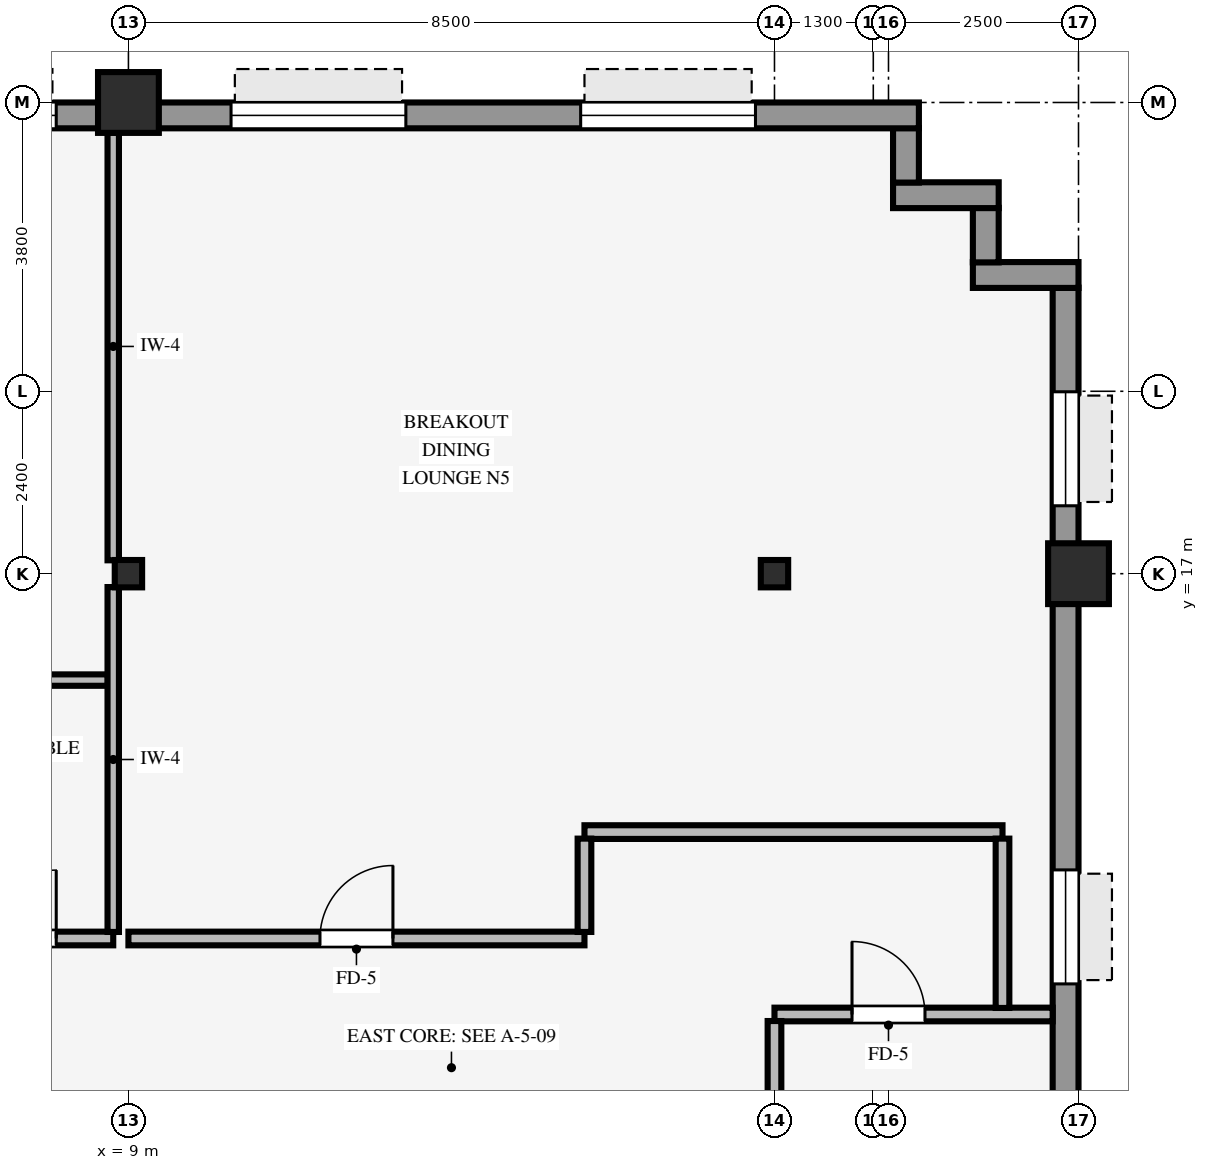
"""IFC4 building model, lengths in metres.
Left out: names, types, materials, properties, quantities, classifications, styles, units other than length and angle.
Written with IfcOpenShell. Run it as: python <this file> out.ifc"""

import sys

from ifc_helpers import new_model, si_unit, direction, frame, frame_2d, origin, origin_2d, place, context, subcontext, project, spatial, rectangle, hollow_rectangle, i_section, extrude, source, transform, mapped, element, fill, save


model = new_model("IFC4")
c1 = context("Model", 3, precision=1e-05, world=origin(), true_north=direction((0.0, 1.0)))
c2 = subcontext(c1, "Body", "Model", "MODEL_VIEW")
j1 = project(units=[si_unit("LENGTHUNIT", "METRE"), si_unit("PLANEANGLEUNIT", "RADIAN")], contexts=[c1])
p1 = place(None, origin())
s1 = spatial("IfcSite", under=j1, at=p1, CompositionType="ELEMENT")
p2 = place(p1, origin())
s2 = spatial("IfcBuilding", under=s1, at=p2, CompositionType="ELEMENT")
p3 = place(p2, frame((0.0, 0.0, 56.8)))
s3 = spatial("IfcBuildingStorey", under=s2, at=p3, CompositionType="ELEMENT", Elevation=56.8)
p4 = place(p3, frame((21.5, 17.0, -0.4), z_axis=(0.0, 0.0, 1.0), x_axis=(1.0, 0.0, 0.0)))
e1 = element("IfcColumn", 1, at=p4, inside=s3, PredefinedType="COLUMN", context=c2, shape_type="SweptSolid", body=[
    extrude(hollow_rectangle(XDim=0.8, YDim=0.8, WallThickness=0.055, InnerFilletRadius=0.055, OuterFilletRadius=0.11, at=origin_2d()), origin(), (0.0, 0.0, 1.0), 3.77),
])
p5 = place(p3, frame((9.0, 23.2, 0.0), z_axis=(0.0, 0.0, 1.0), x_axis=(1.0, 0.0, 0.0)))
e2 = element("IfcColumn", 2, at=p5, inside=s3, PredefinedType="COLUMN", context=c2, shape_type="SweptSolid", body=[
    extrude(hollow_rectangle(XDim=0.8, YDim=0.8, WallThickness=0.055, InnerFilletRadius=0.055, OuterFilletRadius=0.11, at=origin_2d()), origin(), (0.0, 0.0, 1.0), 3.37),
])
for number, where, z_axis, x_axis in (
    (3, (9.0, 17.0, 0.0), (0.0, 0.0, 1.0), (1.0, 0.0, 0.0)),
    (4, (17.5, 17.0, 0.0), (0.0, 0.0, 1.0), (1.0, 0.0, 0.0)),
):
    element("IfcColumn", number, at=place(p3, frame(where, z_axis=z_axis, x_axis=x_axis)), inside=s3, PredefinedType="COLUMN", context=c2, shape_type="SweptSolid", body=[
        extrude(i_section(OverallWidth=0.36, OverallDepth=0.36, WebThickness=0.021, FlangeThickness=0.021, FilletRadius=0.018, at=origin_2d()), origin(), (0.0, 0.0, 1.0), 3.37),
    ])
p6 = place(p3, frame((21.33, -20.764, 0.0), z_axis=(0.0, 0.0, 1.0), x_axis=(0.0, 1.0, 0.0)))
e5 = element("IfcWall", 5, at=p6, inside=s3, PredefinedType="STANDARD", context=c2, shape_type="SweptSolid", body=[
    extrude(rectangle(XDim=41.528, YDim=0.34, at=frame_2d((20.764, 0.0))), origin(), (0.0, 0.0, 1.0), 2.705),
])
p7 = place(p6, frame((26.014, 0.0, 0.0), z_axis=(0.0, 0.0, 1.0), x_axis=(-1.0, 0.0, 0.0)))
e6 = element("IfcOpeningElement", 6, at=p7, cuts=e5, PredefinedType="OPENING", context=c2, shape_type="SweptSolid", body=[
    extrude(rectangle(XDim=1.05, YDim=2.1, at=frame_2d((0.525, 1.05))), frame((0.0, 0.18, 0.0), z_axis=(0.0, -1.0, 0.0), x_axis=(1.0, 0.0, 0.0)), (0.0, 0.0, 1.0), 0.36),
])
p8 = place(p6, frame((1.371, 0.0, 0.8)))
e7 = element("IfcOpeningElement", 7, at=p8, cuts=e5, PredefinedType="OPENING", context=c2, shape_type="SweptSolid", body=[
    extrude(rectangle(XDim=1.5, YDim=1.6, at=frame_2d((0.75, 0.8))), frame((0.0, 0.18, 0.0), z_axis=(0.0, -1.0, 0.0), x_axis=(1.0, 0.0, 0.0)), (0.0, 0.0, 1.0), 0.36),
])
p9 = place(p6, frame((7.662, 0.0, 0.8)))
e8 = element("IfcOpeningElement", 8, at=p9, cuts=e5, PredefinedType="OPENING", context=c2, shape_type="SweptSolid", body=[
    extrude(rectangle(XDim=1.5, YDim=1.6, at=frame_2d((0.75, 0.8))), frame((0.0, 0.18, 0.0), z_axis=(0.0, -1.0, 0.0), x_axis=(1.0, 0.0, 0.0)), (0.0, 0.0, 1.0), 0.36),
])
p10 = place(p6, frame((12.603, 0.0, 0.8)))
e9 = element("IfcOpeningElement", 9, at=p10, cuts=e5, PredefinedType="OPENING", context=c2, shape_type="SweptSolid", body=[
    extrude(rectangle(XDim=1.5, YDim=1.6, at=frame_2d((0.75, 0.8))), frame((0.0, 0.18, 0.0), z_axis=(0.0, -1.0, 0.0), x_axis=(1.0, 0.0, 0.0)), (0.0, 0.0, 1.0), 0.36),
])
p11 = place(p6, frame((16.644, 0.0, 0.8)))
e10 = element("IfcOpeningElement", 10, at=p11, cuts=e5, PredefinedType="OPENING", context=c2, shape_type="SweptSolid", body=[
    extrude(rectangle(XDim=1.5, YDim=1.6, at=frame_2d((0.75, 0.8))), frame((0.0, 0.18, 0.0), z_axis=(0.0, -1.0, 0.0), x_axis=(1.0, 0.0, 0.0)), (0.0, 0.0, 1.0), 0.36),
])
p12 = place(p6, frame((22.485, 0.0, 0.8)))
e11 = element("IfcOpeningElement", 11, at=p12, cuts=e5, PredefinedType="OPENING", context=c2, shape_type="SweptSolid", body=[
    extrude(rectangle(XDim=1.5, YDim=1.6, at=frame_2d((0.75, 0.8))), frame((0.0, 0.18, 0.0), z_axis=(0.0, -1.0, 0.0), x_axis=(1.0, 0.0, 0.0)), (0.0, 0.0, 1.0), 0.36),
])
p13 = place(p6, frame((27.426, 0.0, 0.8)))
e12 = element("IfcOpeningElement", 12, at=p13, cuts=e5, PredefinedType="OPENING", context=c2, shape_type="SweptSolid", body=[
    extrude(rectangle(XDim=1.5, YDim=1.6, at=frame_2d((0.75, 0.8))), frame((0.0, 0.18, 0.0), z_axis=(0.0, -1.0, 0.0), x_axis=(1.0, 0.0, 0.0)), (0.0, 0.0, 1.0), 0.36),
])
p14 = place(p6, frame((32.366, 0.0, 0.8)))
e13 = element("IfcOpeningElement", 13, at=p14, cuts=e5, PredefinedType="OPENING", context=c2, shape_type="SweptSolid", body=[
    extrude(rectangle(XDim=1.5, YDim=1.6, at=frame_2d((0.75, 0.8))), frame((0.0, 0.18, 0.0), z_axis=(0.0, -1.0, 0.0), x_axis=(1.0, 0.0, 0.0)), (0.0, 0.0, 1.0), 0.36),
])
p15 = place(p6, frame((38.657, 0.0, 0.8)))
e14 = element("IfcOpeningElement", 14, at=p15, cuts=e5, PredefinedType="OPENING", context=c2, shape_type="SweptSolid", body=[
    extrude(rectangle(XDim=1.5, YDim=1.6, at=frame_2d((0.75, 0.8))), frame((0.0, 0.18, 0.0), z_axis=(0.0, -1.0, 0.0), x_axis=(1.0, 0.0, 0.0)), (0.0, 0.0, 1.0), 0.36),
])
p16 = place(p3, frame((20.11, 20.93, 0.0), z_axis=(0.0, 0.0, 1.0), x_axis=(1.0, 0.0, 0.0)))
e15 = element("IfcWall", 15, at=p16, inside=s3, PredefinedType="STANDARD", context=c2, shape_type="SweptSolid", body=[
    extrude(rectangle(XDim=1.39, YDim=0.34, at=frame_2d((0.695, 0.0))), origin(), (0.0, 0.0, 1.0), 3.36),
])
p17 = place(p3, frame((20.28, 21.096, 0.0), z_axis=(0.0, 0.0, 1.0), x_axis=(0.0, 1.0, 0.0)))
e16 = element("IfcWall", 16, at=p17, inside=s3, PredefinedType="STANDARD", context=c2, shape_type="SweptSolid", body=[
    extrude(rectangle(XDim=0.718, YDim=0.34, at=frame_2d((0.359, 0.0))), origin(), (0.0, 0.0, 1.0), 3.36),
])
p18 = place(p3, frame((19.06, 21.98, 0.0), z_axis=(0.0, 0.0, 1.0), x_axis=(1.0, 0.0, 0.0)))
e17 = element("IfcWall", 17, at=p18, inside=s3, PredefinedType="STANDARD", context=c2, shape_type="SweptSolid", body=[
    extrude(rectangle(XDim=1.39, YDim=0.34, at=frame_2d((0.695, 0.0))), origin(), (0.0, 0.0, 1.0), 3.36),
])
p19 = place(p3, frame((19.23, 22.146, 0.0), z_axis=(0.0, 0.0, 1.0), x_axis=(0.0, 1.0, 0.0)))
e18 = element("IfcWall", 18, at=p19, inside=s3, PredefinedType="STANDARD", context=c2, shape_type="SweptSolid", body=[
    extrude(rectangle(XDim=0.718, YDim=0.34, at=frame_2d((0.359, 0.0))), origin(), (0.0, 0.0, 1.0), 3.36),
])
p20 = place(p3, frame((-19.4, 23.03, 0.0), z_axis=(0.0, 0.0, 1.0), x_axis=(1.0, 0.0, 0.0)))
e19 = element("IfcWall", 19, at=p20, inside=s3, PredefinedType="STANDARD", context=c2, shape_type="SweptSolid", body=[
    extrude(rectangle(XDim=38.8, YDim=0.34, at=frame_2d((19.4, 0.0))), origin(), (0.0, 0.0, 1.0), 2.705),
])
p21 = place(p20, frame((3.05, 0.0, 0.8)))
e20 = element("IfcOpeningElement", 20, at=p21, cuts=e19, PredefinedType="OPENING", context=c2, shape_type="SweptSolid", body=[
    extrude(rectangle(XDim=2.3, YDim=1.62, at=frame_2d((1.15, 0.81))), frame((0.0, 0.18, 0.0), z_axis=(0.0, -1.0, 0.0), x_axis=(1.0, 0.0, 0.0)), (0.0, 0.0, 1.0), 0.36),
])
p22 = place(p20, frame((5.85, 0.0, 0.8)))
e21 = element("IfcOpeningElement", 21, at=p22, cuts=e19, PredefinedType="OPENING", context=c2, shape_type="SweptSolid", body=[
    extrude(rectangle(XDim=2.3, YDim=1.62, at=frame_2d((1.15, 0.81))), frame((0.0, 0.18, 0.0), z_axis=(0.0, -1.0, 0.0), x_axis=(1.0, 0.0, 0.0)), (0.0, 0.0, 1.0), 0.36),
])
p23 = place(p20, frame((11.35, 0.0, 0.8)))
e22 = element("IfcOpeningElement", 22, at=p23, cuts=e19, PredefinedType="OPENING", context=c2, shape_type="SweptSolid", body=[
    extrude(rectangle(XDim=2.3, YDim=1.62, at=frame_2d((1.15, 0.81))), frame((0.0, 0.18, 0.0), z_axis=(0.0, -1.0, 0.0), x_axis=(1.0, 0.0, 0.0)), (0.0, 0.0, 1.0), 0.36),
])
p24 = place(p20, frame((15.95, 0.0, 0.8)))
e23 = element("IfcOpeningElement", 23, at=p24, cuts=e19, PredefinedType="OPENING", context=c2, shape_type="SweptSolid", body=[
    extrude(rectangle(XDim=2.3, YDim=1.62, at=frame_2d((1.15, 0.81))), frame((0.0, 0.18, 0.0), z_axis=(0.0, -1.0, 0.0), x_axis=(1.0, 0.0, 0.0)), (0.0, 0.0, 1.0), 0.36),
])
p25 = place(p20, frame((20.55, 0.0, 0.8)))
e24 = element("IfcOpeningElement", 24, at=p25, cuts=e19, PredefinedType="OPENING", context=c2, shape_type="SweptSolid", body=[
    extrude(rectangle(XDim=2.3, YDim=1.62, at=frame_2d((1.15, 0.81))), frame((0.0, 0.18, 0.0), z_axis=(0.0, -1.0, 0.0), x_axis=(1.0, 0.0, 0.0)), (0.0, 0.0, 1.0), 0.36),
])
p26 = place(p20, frame((25.15, 0.0, 0.8)))
e25 = element("IfcOpeningElement", 25, at=p26, cuts=e19, PredefinedType="OPENING", context=c2, shape_type="SweptSolid", body=[
    extrude(rectangle(XDim=2.3, YDim=1.62, at=frame_2d((1.15, 0.81))), frame((0.0, 0.18, 0.0), z_axis=(0.0, -1.0, 0.0), x_axis=(1.0, 0.0, 0.0)), (0.0, 0.0, 1.0), 0.36),
])
p27 = place(p20, frame((29.75, 0.0, 0.8)))
e26 = element("IfcOpeningElement", 26, at=p27, cuts=e19, PredefinedType="OPENING", context=c2, shape_type="SweptSolid", body=[
    extrude(rectangle(XDim=2.3, YDim=1.62, at=frame_2d((1.15, 0.81))), frame((0.0, 0.18, 0.0), z_axis=(0.0, -1.0, 0.0), x_axis=(1.0, 0.0, 0.0)), (0.0, 0.0, 1.0), 0.36),
])
p28 = place(p20, frame((34.35, 0.0, 0.8)))
e27 = element("IfcOpeningElement", 27, at=p28, cuts=e19, PredefinedType="OPENING", context=c2, shape_type="SweptSolid", body=[
    extrude(rectangle(XDim=2.3, YDim=1.62, at=frame_2d((1.15, 0.81))), frame((0.0, 0.18, 0.0), z_axis=(0.0, -1.0, 0.0), x_axis=(1.0, 0.0, 0.0)), (0.0, 0.0, 1.0), 0.36),
])
p29 = place(p3, frame((17.5, 11.2, 0.0), z_axis=(0.0, 0.0, 1.0), x_axis=(1.0, 0.0, 0.0)))
e28 = element("IfcWall", 28, at=p29, inside=s3, PredefinedType="PARTITIONING", context=c2, shape_type="SweptSolid", body=[
    extrude(rectangle(XDim=3.66, YDim=0.18, at=frame_2d((1.83, 0.0))), origin(), (0.0, 0.0, 1.0), 3.36),
])
p30 = place(p29, frame((1.02, 0.0, 0.0)))
e29 = element("IfcOpeningElement", 29, at=p30, cuts=e28, PredefinedType="OPENING", context=c2, shape_type="SweptSolid", body=[
    extrude(rectangle(XDim=0.96, YDim=2.1, at=frame_2d((0.48, 1.05))), frame((0.0, 0.1, 0.0), z_axis=(0.0, -1.0, 0.0), x_axis=(1.0, 0.0, 0.0)), (0.0, 0.0, 1.0), 0.2),
])
p31 = place(p3, frame((-15.0, 12.2, 0.0), z_axis=(0.0, 0.0, 1.0), x_axis=(1.0, 0.0, 0.0)))
e30 = element("IfcWall", 30, at=p31, inside=s3, PredefinedType="PARTITIONING", context=c2, shape_type="SweptSolid", body=[
    extrude(rectangle(XDim=23.8, YDim=0.18, at=frame_2d((11.9, 0.0))), origin(), (0.0, 0.0, 1.0), 3.36),
])
p32 = place(p31, frame((7.655, 0.0, 0.0)))
e31 = element("IfcOpeningElement", 31, at=p32, cuts=e30, PredefinedType="OPENING", context=c2, shape_type="SweptSolid", body=[
    extrude(rectangle(XDim=0.96, YDim=2.1, at=frame_2d((0.48, 1.05))), frame((0.0, 0.1, 0.0), z_axis=(0.0, -1.0, 0.0), x_axis=(1.0, 0.0, 0.0)), (0.0, 0.0, 1.0), 0.2),
])
p33 = place(p31, frame((1.755, 0.0, 0.0)))
e32 = element("IfcOpeningElement", 32, at=p33, cuts=e30, PredefinedType="OPENING", context=c2, shape_type="SweptSolid", body=[
    extrude(rectangle(XDim=0.96, YDim=2.1, at=frame_2d((0.48, 1.05))), frame((0.0, 0.1, 0.0), z_axis=(0.0, -1.0, 0.0), x_axis=(1.0, 0.0, 0.0)), (0.0, 0.0, 1.0), 0.2),
])
p34 = place(p31, frame((19.65, 0.0, 0.0)))
e33 = element("IfcOpeningElement", 33, at=p34, cuts=e30, PredefinedType="OPENING", context=c2, shape_type="SweptSolid", body=[
    extrude(rectangle(XDim=0.9, YDim=2.1, at=frame_2d((0.45, 1.05))), frame((0.0, 0.1, 0.0), z_axis=(0.0, -1.0, 0.0), x_axis=(1.0, 0.0, 0.0)), (0.0, 0.0, 1.0), 0.2),
])
p35 = place(p31, frame((17.05, 0.0, 0.0)))
e34 = element("IfcOpeningElement", 34, at=p35, cuts=e30, PredefinedType="OPENING", context=c2, shape_type="SweptSolid", body=[
    extrude(rectangle(XDim=0.9, YDim=2.1, at=frame_2d((0.45, 1.05))), frame((0.0, 0.1, 0.0), z_axis=(0.0, -1.0, 0.0), x_axis=(1.0, 0.0, 0.0)), (0.0, 0.0, 1.0), 0.2),
])
p36 = place(p31, frame((22.15, 0.0, 0.0)))
e35 = element("IfcOpeningElement", 35, at=p36, cuts=e30, PredefinedType="OPENING", context=c2, shape_type="SweptSolid", body=[
    extrude(rectangle(XDim=0.9, YDim=2.1, at=frame_2d((0.45, 1.05))), frame((0.0, 0.1, 0.0), z_axis=(0.0, -1.0, 0.0), x_axis=(1.0, 0.0, 0.0)), (0.0, 0.0, 1.0), 0.2),
])
p37 = place(p31, frame((14.72, 0.0, 0.0)))
e36 = element("IfcOpeningElement", 36, at=p37, cuts=e30, PredefinedType="OPENING", context=c2, shape_type="SweptSolid", body=[
    extrude(rectangle(XDim=0.96, YDim=2.1, at=frame_2d((0.48, 1.05))), frame((0.0, 0.1, 0.0), z_axis=(0.0, -1.0, 0.0), x_axis=(1.0, 0.0, 0.0)), (0.0, 0.0, 1.0), 0.2),
])
p38 = place(p3, frame((9.0, 12.2, 0.0), z_axis=(0.0, 0.0, 1.0), x_axis=(1.0, 0.0, 0.0)))
e37 = element("IfcWall", 37, at=p38, inside=s3, PredefinedType="PARTITIONING", context=c2, shape_type="SweptSolid", body=[
    extrude(rectangle(XDim=6.0, YDim=0.18, at=frame_2d((3.0, 0.0))), origin(), (0.0, 0.0, 1.0), 3.36),
])
p39 = place(p38, frame((2.52, 0.0, 0.0)))
e38 = element("IfcOpeningElement", 38, at=p39, cuts=e37, PredefinedType="OPENING", context=c2, shape_type="SweptSolid", body=[
    extrude(rectangle(XDim=0.96, YDim=2.1, at=frame_2d((0.48, 1.05))), frame((0.0, 0.1, 0.0), z_axis=(0.0, -1.0, 0.0), x_axis=(1.0, 0.0, 0.0)), (0.0, 0.0, 1.0), 0.2),
])
p40 = place(p3, frame((15.0, 13.6, 0.0), z_axis=(0.0, 0.0, 1.0), x_axis=(1.0, 0.0, 0.0)))
e39 = element("IfcWall", 39, at=p40, inside=s3, PredefinedType="PARTITIONING", context=c2, shape_type="SweptSolid", body=[
    extrude(rectangle(XDim=5.5, YDim=0.18, at=frame_2d((2.75, 0.0))), origin(), (0.0, 0.0, 1.0), 2.942),
])
p41 = place(p3, frame((1.2, 15.6, 0.0), z_axis=(0.0, 0.0, 1.0), x_axis=(1.0, 0.0, 0.0)))
e40 = element("IfcWall", 40, at=p41, inside=s3, PredefinedType="PARTITIONING", context=c2, shape_type="SweptSolid", body=[
    extrude(rectangle(XDim=7.529, YDim=0.15, at=frame_2d((3.765, 0.0))), origin(), (0.0, 0.0, 1.0), 3.36),
])
p42 = place(p3, frame((8.8, 12.286, 0.0), z_axis=(0.0, 0.0, 1.0), x_axis=(0.0, 1.0, 0.0)))
e41 = element("IfcWall", 41, at=p42, inside=s3, PredefinedType="PARTITIONING", context=c2, shape_type="SweptSolid", body=[
    extrude(rectangle(XDim=4.538, YDim=0.15, at=frame_2d((2.269, 0.0))), origin(), (0.0, 0.0, 1.0), 2.738),
])
p43 = place(p3, frame((8.8, 17.176, 0.0), z_axis=(0.0, 0.0, 1.0), x_axis=(0.0, 1.0, 0.0)))
e42 = element("IfcWall", 42, at=p43, inside=s3, PredefinedType="PARTITIONING", context=c2, shape_type="SweptSolid", body=[
    extrude(rectangle(XDim=5.628, YDim=0.15, at=frame_2d((2.814, 0.0))), origin(), (0.0, 0.0, 1.0), 2.738),
])
p44 = place(p3, frame((15.0, 12.286, 0.0), z_axis=(0.0, 0.0, 1.0), x_axis=(0.0, 1.0, 0.0)))
e43 = element("IfcWall", 43, at=p44, inside=s3, PredefinedType="PARTITIONING", context=c2, shape_type="SweptSolid", body=[
    extrude(rectangle(XDim=1.228, YDim=0.18, at=frame_2d((0.614, 0.0))), origin(), (0.0, 0.0, 1.0), 3.36),
])
p45 = place(p3, frame((17.5, 10.146, 0.0), z_axis=(0.0, 0.0, 1.0), x_axis=(0.0, 1.0, 0.0)))
e44 = element("IfcWall", 44, at=p45, inside=s3, PredefinedType="PARTITIONING", context=c2, shape_type="SweptSolid", body=[
    extrude(rectangle(XDim=0.968, YDim=0.18, at=frame_2d((0.484, 0.0))), origin(), (0.0, 0.0, 1.0), 2.738),
])
p46 = place(p3, frame((20.5, 11.286, 0.0), z_axis=(0.0, 0.0, 1.0), x_axis=(0.0, 1.0, 0.0)))
e45 = element("IfcWall", 45, at=p46, inside=s3, PredefinedType="PARTITIONING", context=c2, shape_type="SweptSolid", body=[
    extrude(rectangle(XDim=2.228, YDim=0.18, at=frame_2d((1.114, 0.0))), origin(), (0.0, 0.0, 1.0), 3.36),
])
m1 = source(origin(), c2, "Body", "SweptSolid", [
    extrude(rectangle(XDim=1.5, YDim=1.6, at=frame_2d((0.75, 0.8))), frame((0.0, 0.03, 0.0), z_axis=(0.0, -1.0, 0.0), x_axis=(1.0, 0.0, 0.0)), (0.0, 0.0, 1.0), 0.06),
])
p47 = place(p14, origin())
e46 = element("IfcWindow", 46, at=p47, inside=s3, PartitioningType="SINGLE_PANEL", PredefinedType="WINDOW", context=c2, shape_type="MappedRepresentation", body=[
    mapped(m1, transform((0.0, 0.0, 0.0), scale=1.0)),
])
fill(e13, e46)
p48 = place(p15, origin())
e47 = element("IfcWindow", 47, at=p48, inside=s3, PartitioningType="SINGLE_PANEL", PredefinedType="WINDOW", context=c2, shape_type="MappedRepresentation", body=[
    mapped(m1, transform((0.0, 0.0, 0.0), scale=1.0)),
])
fill(e14, e47)
m2 = source(origin(), c2, "Body", "SweptSolid", [
    extrude(rectangle(XDim=2.3, YDim=1.62, at=frame_2d((1.15, 0.81))), frame((0.0, 0.03, 0.0), z_axis=(0.0, -1.0, 0.0), x_axis=(1.0, 0.0, 0.0)), (0.0, 0.0, 1.0), 0.06),
])
p49 = place(p26, origin())
e48 = element("IfcWindow", 48, at=p49, inside=s3, PartitioningType="SINGLE_PANEL", PredefinedType="WINDOW", context=c2, shape_type="MappedRepresentation", body=[
    mapped(m2, transform((0.0, 0.0, 0.0), scale=1.0)),
])
fill(e25, e48)
p50 = place(p27, origin())
e49 = element("IfcWindow", 49, at=p50, inside=s3, PartitioningType="SINGLE_PANEL", PredefinedType="WINDOW", context=c2, shape_type="MappedRepresentation", body=[
    mapped(m2, transform((0.0, 0.0, 0.0), scale=1.0)),
])
fill(e26, e49)
p51 = place(p28, origin())
e50 = element("IfcWindow", 50, at=p51, inside=s3, PartitioningType="SINGLE_PANEL", PredefinedType="WINDOW", context=c2, shape_type="MappedRepresentation", body=[
    mapped(m2, transform((0.0, 0.0, 0.0), scale=1.0)),
])
fill(e27, e50)
m3 = source(origin(), c2, "Body", "SweptSolid", [
    extrude(rectangle(XDim=0.96, YDim=2.1, at=frame_2d((0.48, 1.05))), frame((0.0, 0.025, 0.0), z_axis=(0.0, -1.0, 0.0), x_axis=(1.0, 0.0, 0.0)), (0.0, 0.0, 1.0), 0.05),
])
p52 = place(p39, origin())
e51 = element("IfcDoor", 51, at=p52, inside=s3, OperationType="SINGLE_SWING_RIGHT", PredefinedType="DOOR", context=c2, shape_type="MappedRepresentation", body=[
    mapped(m3, transform((0.0, 0.0, 0.0), scale=1.0)),
])
fill(e38, e51)
p53 = place(p30, origin())
e52 = element("IfcDoor", 52, at=p53, inside=s3, OperationType="SINGLE_SWING_LEFT", PredefinedType="DOOR", context=c2, shape_type="MappedRepresentation", body=[
    mapped(m3, transform((0.0, 0.0, 0.0), scale=1.0)),
])
fill(e29, e52)
m4 = source(origin(), c2, "Body", "SweptSolid", [
    extrude(rectangle(XDim=0.9, YDim=2.1, at=frame_2d((0.45, 1.05))), frame((0.0, 0.025, 0.0), z_axis=(0.0, -1.0, 0.0), x_axis=(1.0, 0.0, 0.0)), (0.0, 0.0, 1.0), 0.05),
])
p54 = place(p36, origin())
e53 = element("IfcDoor", 53, at=p54, inside=s3, OperationType="SINGLE_SWING_RIGHT", PredefinedType="DOOR", context=c2, shape_type="MappedRepresentation", body=[
    mapped(m4, transform((0.0, 0.0, 0.0), scale=1.0)),
])
fill(e35, e53)
save(model, sys.argv[1])
